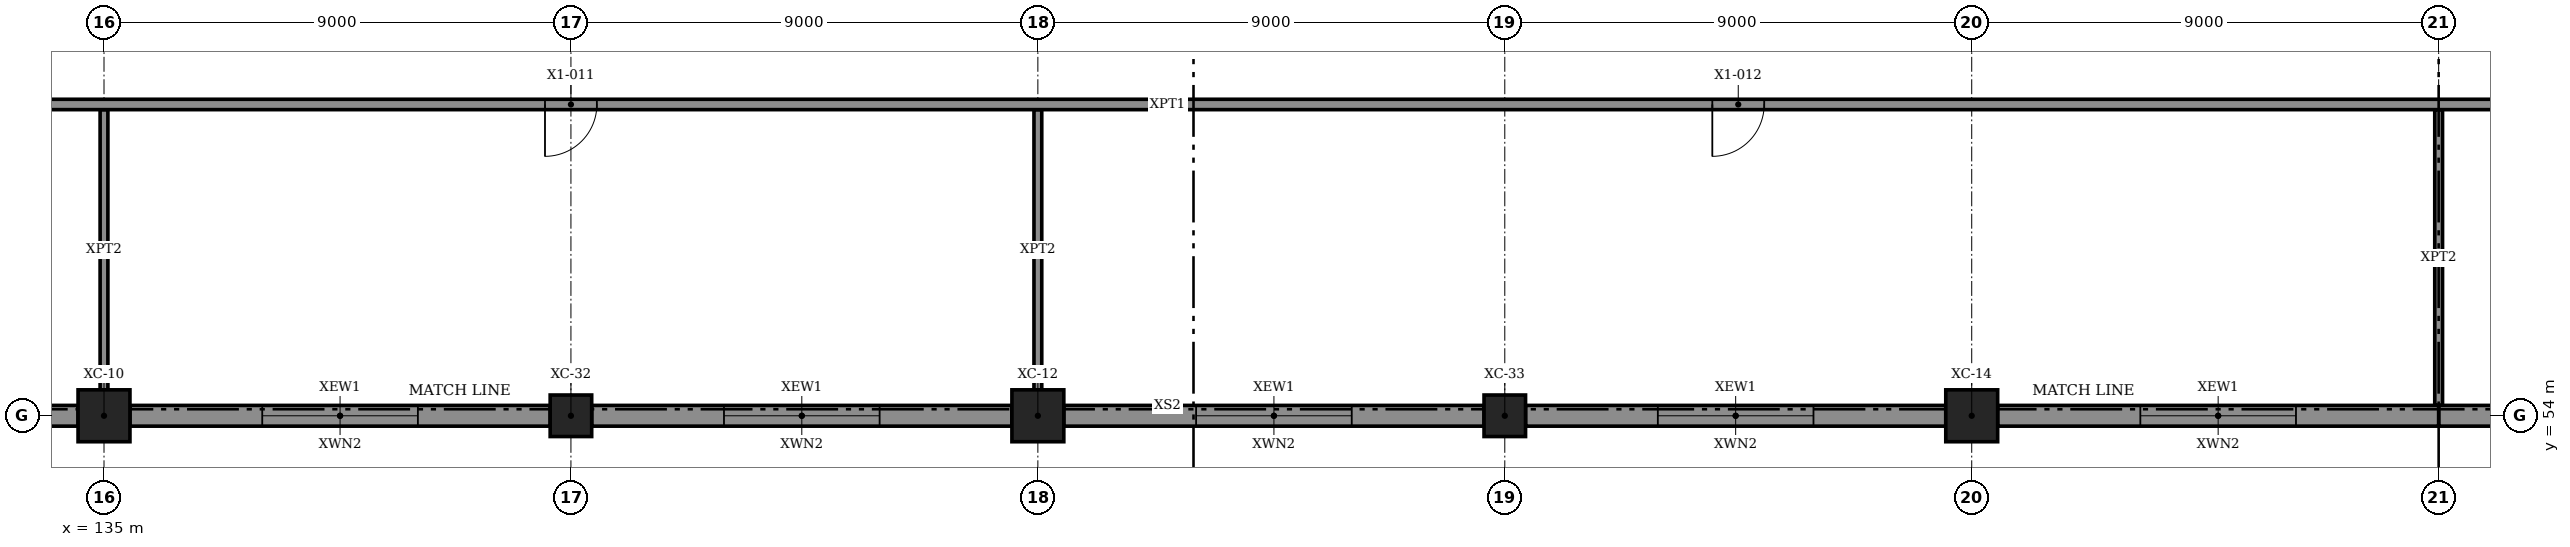
"""IFC4 building model, lengths in metres.
Left out: names, types, materials, properties, quantities, classifications, styles, units other than length and angle.
Written with IfcOpenShell. Run it as: python <this file> out.ifc"""

import sys

from ifc_helpers import new_model, si_unit, direction, frame, frame_2d, origin, origin_2d, place, context, subcontext, project, spatial, rectangle, hollow_rectangle, extrude, element, fill, save


model = new_model("IFC4")
c1 = context("Model", 3, precision=1e-05, world=origin(), true_north=direction((0.0, 1.0)))
c2 = subcontext(c1, "Body", "Model", "MODEL_VIEW")
j1 = project(units=[si_unit("LENGTHUNIT", "METRE"), si_unit("PLANEANGLEUNIT", "RADIAN")], contexts=[c1])
p1 = place(None, origin())
s1 = spatial("IfcSite", under=j1, at=p1, CompositionType="ELEMENT")
p2 = place(p1, origin())
s2 = spatial("IfcBuilding", under=s1, at=p2, CompositionType="ELEMENT")
p3 = place(p2, frame((0.0, 0.0, 6.0)))
s3 = spatial("IfcBuildingStorey", under=s2, at=p3, CompositionType="ELEMENT", Elevation=6.0)
for number, where, z_axis, x_axis in (
    (1, (135.0, 54.0, 0.0), (0.0, 0.0, 1.0), (1.0, 0.0, 0.0)),
    (2, (153.0, 54.0, 0.0), (0.0, 0.0, 1.0), (1.0, 0.0, 0.0)),
    (3, (171.0, 54.0, 0.0), (0.0, 0.0, 1.0), (1.0, 0.0, 0.0)),
):
    element("IfcColumn", number, at=place(p3, frame(where, z_axis=z_axis, x_axis=x_axis)), inside=s3, PredefinedType="COLUMN", context=c2, shape_type="SweptSolid", body=[
        extrude(hollow_rectangle(XDim=1.0, YDim=1.0, WallThickness=0.032, at=origin_2d()), origin(), (0.0, 0.0, 1.0), 5.5),
    ])
for number, where, z_axis, x_axis in (
    (4, (144.0, 54.0, 0.0), (0.0, 0.0, 1.0), (1.0, 0.0, 0.0)),
    (5, (162.0, 54.0, 0.0), (0.0, 0.0, 1.0), (1.0, 0.0, 0.0)),
):
    element("IfcColumn", number, at=place(p3, frame(where, z_axis=z_axis, x_axis=x_axis)), inside=s3, PredefinedType="COLUMN", context=c2, shape_type="SweptSolid", body=[
        extrude(rectangle(XDim=0.8, YDim=0.8, at=origin_2d()), origin(), (0.0, 0.0, 1.0), 5.5),
    ])
p4 = place(p3, frame((126.0, 54.0, -0.28), z_axis=(0.0, 0.0, 1.0), x_axis=(1.0, 0.0, 0.0)))
e6 = element("IfcWall", 6, at=p4, inside=s3, PredefinedType="SOLIDWALL", context=c2, shape_type="SweptSolid", body=[
    extrude(rectangle(XDim=8.5, YDim=0.4, at=frame_2d((4.25, 0.0))), origin(), (0.0, 0.0, 1.0), 5.78),
])
p5 = place(p4, frame((2.75, 0.0, 1.18)))
e7 = element("IfcOpeningElement", 7, at=p5, cuts=e6, PredefinedType="OPENING", context=c2, shape_type="SweptSolid", body=[
    extrude(rectangle(XDim=3.0, YDim=1.8, at=frame_2d((1.5, 0.9))), frame((0.0, 0.21, 0.0), z_axis=(0.0, -1.0, 0.0), x_axis=(1.0, 0.0, 0.0)), (0.0, 0.0, 1.0), 0.42),
])
p6 = place(p3, frame((135.5, 54.0, -0.28), z_axis=(0.0, 0.0, 1.0), x_axis=(1.0, 0.0, 0.0)))
e8 = element("IfcWall", 8, at=p6, inside=s3, PredefinedType="SOLIDWALL", context=c2, shape_type="SweptSolid", body=[
    extrude(rectangle(XDim=8.1, YDim=0.4, at=frame_2d((4.05, 0.0))), origin(), (0.0, 0.0, 1.0), 5.78),
])
p7 = place(p6, frame((2.55, 0.0, 1.18)))
e9 = element("IfcOpeningElement", 9, at=p7, cuts=e8, PredefinedType="OPENING", context=c2, shape_type="SweptSolid", body=[
    extrude(rectangle(XDim=3.0, YDim=1.8, at=frame_2d((1.5, 0.9))), frame((0.0, 0.21, 0.0), z_axis=(0.0, -1.0, 0.0), x_axis=(1.0, 0.0, 0.0)), (0.0, 0.0, 1.0), 0.42),
])
p8 = place(p3, frame((144.4, 54.0, -0.28), z_axis=(0.0, 0.0, 1.0), x_axis=(1.0, 0.0, 0.0)))
e10 = element("IfcWall", 10, at=p8, inside=s3, PredefinedType="SOLIDWALL", context=c2, shape_type="SweptSolid", body=[
    extrude(rectangle(XDim=8.1, YDim=0.4, at=frame_2d((4.05, 0.0))), origin(), (0.0, 0.0, 1.0), 5.78),
])
p9 = place(p8, frame((2.55, 0.0, 1.18)))
e11 = element("IfcOpeningElement", 11, at=p9, cuts=e10, PredefinedType="OPENING", context=c2, shape_type="SweptSolid", body=[
    extrude(rectangle(XDim=3.0, YDim=1.8, at=frame_2d((1.5, 0.9))), frame((0.0, 0.21, 0.0), z_axis=(0.0, -1.0, 0.0), x_axis=(1.0, 0.0, 0.0)), (0.0, 0.0, 1.0), 0.42),
])
p10 = place(p3, frame((153.5, 54.0, -0.28), z_axis=(0.0, 0.0, 1.0), x_axis=(1.0, 0.0, 0.0)))
e12 = element("IfcWall", 12, at=p10, inside=s3, PredefinedType="SOLIDWALL", context=c2, shape_type="SweptSolid", body=[
    extrude(rectangle(XDim=8.1, YDim=0.4, at=frame_2d((4.05, 0.0))), origin(), (0.0, 0.0, 1.0), 5.78),
])
p11 = place(p10, frame((2.55, 0.0, 1.18)))
e13 = element("IfcOpeningElement", 13, at=p11, cuts=e12, PredefinedType="OPENING", context=c2, shape_type="SweptSolid", body=[
    extrude(rectangle(XDim=3.0, YDim=1.8, at=frame_2d((1.5, 0.9))), frame((0.0, 0.21, 0.0), z_axis=(0.0, -1.0, 0.0), x_axis=(1.0, 0.0, 0.0)), (0.0, 0.0, 1.0), 0.42),
])
p12 = place(p3, frame((162.4, 54.0, -0.28), z_axis=(0.0, 0.0, 1.0), x_axis=(1.0, 0.0, 0.0)))
e14 = element("IfcWall", 14, at=p12, inside=s3, PredefinedType="SOLIDWALL", context=c2, shape_type="SweptSolid", body=[
    extrude(rectangle(XDim=8.1, YDim=0.4, at=frame_2d((4.05, 0.0))), origin(), (0.0, 0.0, 1.0), 5.78),
])
p13 = place(p12, frame((2.55, 0.0, 1.18)))
e15 = element("IfcOpeningElement", 15, at=p13, cuts=e14, PredefinedType="OPENING", context=c2, shape_type="SweptSolid", body=[
    extrude(rectangle(XDim=3.0, YDim=1.8, at=frame_2d((1.5, 0.9))), frame((0.0, 0.21, 0.0), z_axis=(0.0, -1.0, 0.0), x_axis=(1.0, 0.0, 0.0)), (0.0, 0.0, 1.0), 0.42),
])
p14 = place(p3, frame((171.5, 54.0, -0.28), z_axis=(0.0, 0.0, 1.0), x_axis=(1.0, 0.0, 0.0)))
e16 = element("IfcWall", 16, at=p14, inside=s3, PredefinedType="SOLIDWALL", context=c2, shape_type="SweptSolid", body=[
    extrude(rectangle(XDim=8.5, YDim=0.4, at=frame_2d((4.25, 0.0))), origin(), (0.0, 0.0, 1.0), 5.78),
])
p15 = place(p14, frame((2.75, 0.0, 1.18)))
e17 = element("IfcOpeningElement", 17, at=p15, cuts=e16, PredefinedType="OPENING", context=c2, shape_type="SweptSolid", body=[
    extrude(rectangle(XDim=3.0, YDim=1.8, at=frame_2d((1.5, 0.9))), frame((0.0, 0.21, 0.0), z_axis=(0.0, -1.0, 0.0), x_axis=(1.0, 0.0, 0.0)), (0.0, 0.0, 1.0), 0.42),
])
p16 = place(p3, frame((180.0, 54.0, -0.28), z_axis=(0.0, 0.0, 1.0), x_axis=(1.0, 0.0, 0.0)))
e18 = element("IfcWall", 18, at=p16, inside=s3, PredefinedType="SOLIDWALL", context=c2, shape_type="SweptSolid", body=[
    extrude(rectangle(XDim=8.5, YDim=0.4, at=frame_2d((4.25, 0.0))), origin(), (0.0, 0.0, 1.0), 5.78),
])
p17 = place(p16, frame((2.75, 0.0, 1.18)))
e19 = element("IfcOpeningElement", 19, at=p17, cuts=e18, PredefinedType="OPENING", context=c2, shape_type="SweptSolid", body=[
    extrude(rectangle(XDim=3.0, YDim=1.8, at=frame_2d((1.5, 0.9))), frame((0.0, 0.21, 0.0), z_axis=(0.0, -1.0, 0.0), x_axis=(1.0, 0.0, 0.0)), (0.0, 0.0, 1.0), 0.42),
])
p18 = place(p3, frame((99.2, 60.0, 0.0), z_axis=(0.0, 0.0, 1.0), x_axis=(1.0, 0.0, 0.0)))
e20 = element("IfcWall", 20, at=p18, inside=s3, PredefinedType="PARTITIONING", context=c2, shape_type="SweptSolid", body=[
    extrude(rectangle(XDim=161.6, YDim=0.2, at=frame_2d((80.8, 0.0))), origin(), (0.0, 0.0, 1.0), 5.25),
])
p19 = place(p18, frame((8.3, 0.0, 0.015)))
e21 = element("IfcOpeningElement", 21, at=p19, cuts=e20, PredefinedType="OPENING", context=c2, shape_type="SweptSolid", body=[
    extrude(rectangle(XDim=1.0, YDim=2.4, at=frame_2d((0.5, 1.2))), frame((0.0, 0.11, 0.0), z_axis=(0.0, -1.0, 0.0), x_axis=(1.0, 0.0, 0.0)), (0.0, 0.0, 1.0), 0.22),
])
p20 = place(p18, frame((26.3, 0.0, 0.015)))
e22 = element("IfcOpeningElement", 22, at=p20, cuts=e20, PredefinedType="OPENING", context=c2, shape_type="SweptSolid", body=[
    extrude(rectangle(XDim=1.0, YDim=2.4, at=frame_2d((0.5, 1.2))), frame((0.0, 0.11, 0.0), z_axis=(0.0, -1.0, 0.0), x_axis=(1.0, 0.0, 0.0)), (0.0, 0.0, 1.0), 0.22),
])
p21 = place(p18, frame((44.3, 0.0, 0.015)))
e23 = element("IfcOpeningElement", 23, at=p21, cuts=e20, PredefinedType="OPENING", context=c2, shape_type="SweptSolid", body=[
    extrude(rectangle(XDim=1.0, YDim=2.4, at=frame_2d((0.5, 1.2))), frame((0.0, 0.11, 0.0), z_axis=(0.0, -1.0, 0.0), x_axis=(1.0, 0.0, 0.0)), (0.0, 0.0, 1.0), 0.22),
])
p22 = place(p18, frame((66.8, 0.0, 0.015)))
e24 = element("IfcOpeningElement", 24, at=p22, cuts=e20, PredefinedType="OPENING", context=c2, shape_type="SweptSolid", body=[
    extrude(rectangle(XDim=1.0, YDim=2.4, at=frame_2d((0.5, 1.2))), frame((0.0, 0.11, 0.0), z_axis=(0.0, -1.0, 0.0), x_axis=(1.0, 0.0, 0.0)), (0.0, 0.0, 1.0), 0.22),
])
p23 = place(p18, frame((89.3, 0.0, 0.015)))
e25 = element("IfcOpeningElement", 25, at=p23, cuts=e20, PredefinedType="OPENING", context=c2, shape_type="SweptSolid", body=[
    extrude(rectangle(XDim=1.0, YDim=2.4, at=frame_2d((0.5, 1.2))), frame((0.0, 0.11, 0.0), z_axis=(0.0, -1.0, 0.0), x_axis=(1.0, 0.0, 0.0)), (0.0, 0.0, 1.0), 0.22),
])
p24 = place(p18, frame((107.3, 0.0, 0.015)))
e26 = element("IfcOpeningElement", 26, at=p24, cuts=e20, PredefinedType="OPENING", context=c2, shape_type="SweptSolid", body=[
    extrude(rectangle(XDim=1.0, YDim=2.4, at=frame_2d((0.5, 1.2))), frame((0.0, 0.11, 0.0), z_axis=(0.0, -1.0, 0.0), x_axis=(1.0, 0.0, 0.0)), (0.0, 0.0, 1.0), 0.22),
])
p25 = place(p18, frame((125.3, 0.0, 0.015)))
e27 = element("IfcOpeningElement", 27, at=p25, cuts=e20, PredefinedType="OPENING", context=c2, shape_type="SweptSolid", body=[
    extrude(rectangle(XDim=1.0, YDim=2.4, at=frame_2d((0.5, 1.2))), frame((0.0, 0.11, 0.0), z_axis=(0.0, -1.0, 0.0), x_axis=(1.0, 0.0, 0.0)), (0.0, 0.0, 1.0), 0.22),
])
p26 = place(p18, frame((147.8, 0.0, 0.015)))
e28 = element("IfcOpeningElement", 28, at=p26, cuts=e20, PredefinedType="OPENING", context=c2, shape_type="SweptSolid", body=[
    extrude(rectangle(XDim=1.0, YDim=2.4, at=frame_2d((0.5, 1.2))), frame((0.0, 0.11, 0.0), z_axis=(0.0, -1.0, 0.0), x_axis=(1.0, 0.0, 0.0)), (0.0, 0.0, 1.0), 0.22),
])
for number, where, z_axis, x_axis in (
    (29, (135.0, 54.5, 0.0), (0.0, 0.0, 1.0), (0.0, 1.0, 0.0)),
    (30, (153.0, 54.5, 0.0), (0.0, 0.0, 1.0), (0.0, 1.0, 0.0)),
):
    element("IfcWall", number, at=place(p3, frame(where, z_axis=z_axis, x_axis=x_axis)), inside=s3, PredefinedType="PARTITIONING", context=c2, shape_type="SweptSolid", body=[
        extrude(rectangle(XDim=5.4, YDim=0.15, at=frame_2d((2.7, 0.0))), origin(), (0.0, 0.0, 1.0), 5.25),
    ])
p27 = place(p3, frame((180.0, 54.2, 0.0), z_axis=(0.0, 0.0, 1.0), x_axis=(0.0, 1.0, 0.0)))
e31 = element("IfcWall", 31, at=p27, inside=s3, PredefinedType="PARTITIONING", context=c2, shape_type="SweptSolid", body=[
    extrude(rectangle(XDim=5.7, YDim=0.15, at=frame_2d((2.85, 0.0))), origin(), (0.0, 0.0, 1.0), 5.25),
])
p28 = place(p7, origin())
e32 = element("IfcWindow", 32, at=p28, inside=s3, PartitioningType="TRIPLE_PANEL_VERTICAL", PredefinedType="WINDOW", context=c2, shape_type="SweptSolid", body=[
    extrude(rectangle(XDim=3.0, YDim=1.8, at=frame_2d((1.5, 0.9))), frame((0.0, 0.03, 0.0), z_axis=(0.0, -1.0, 0.0), x_axis=(1.0, 0.0, 0.0)), (0.0, 0.0, 1.0), 0.06),
])
fill(e9, e32)
p29 = place(p9, origin())
e33 = element("IfcWindow", 33, at=p29, inside=s3, PartitioningType="TRIPLE_PANEL_VERTICAL", PredefinedType="WINDOW", context=c2, shape_type="SweptSolid", body=[
    extrude(rectangle(XDim=3.0, YDim=1.8, at=frame_2d((1.5, 0.9))), frame((0.0, 0.03, 0.0), z_axis=(0.0, -1.0, 0.0), x_axis=(1.0, 0.0, 0.0)), (0.0, 0.0, 1.0), 0.06),
])
fill(e11, e33)
p30 = place(p11, origin())
e34 = element("IfcWindow", 34, at=p30, inside=s3, PartitioningType="TRIPLE_PANEL_VERTICAL", PredefinedType="WINDOW", context=c2, shape_type="SweptSolid", body=[
    extrude(rectangle(XDim=3.0, YDim=1.8, at=frame_2d((1.5, 0.9))), frame((0.0, 0.03, 0.0), z_axis=(0.0, -1.0, 0.0), x_axis=(1.0, 0.0, 0.0)), (0.0, 0.0, 1.0), 0.06),
])
fill(e13, e34)
p31 = place(p13, origin())
e35 = element("IfcWindow", 35, at=p31, inside=s3, PartitioningType="TRIPLE_PANEL_VERTICAL", PredefinedType="WINDOW", context=c2, shape_type="SweptSolid", body=[
    extrude(rectangle(XDim=3.0, YDim=1.8, at=frame_2d((1.5, 0.9))), frame((0.0, 0.03, 0.0), z_axis=(0.0, -1.0, 0.0), x_axis=(1.0, 0.0, 0.0)), (0.0, 0.0, 1.0), 0.06),
])
fill(e15, e35)
p32 = place(p15, origin())
e36 = element("IfcWindow", 36, at=p32, inside=s3, PartitioningType="TRIPLE_PANEL_VERTICAL", PredefinedType="WINDOW", context=c2, shape_type="SweptSolid", body=[
    extrude(rectangle(XDim=3.0, YDim=1.8, at=frame_2d((1.5, 0.9))), frame((0.0, 0.03, 0.0), z_axis=(0.0, -1.0, 0.0), x_axis=(1.0, 0.0, 0.0)), (0.0, 0.0, 1.0), 0.06),
])
fill(e17, e36)
p33 = place(p21, frame((1.0, 0.0, 0.0), z_axis=(0.0, 0.0, 1.0), x_axis=(-1.0, 0.0, 0.0)))
e37 = element("IfcDoor", 37, at=p33, inside=s3, OperationType="SINGLE_SWING_LEFT", PredefinedType="DOOR", context=c2, shape_type="SweptSolid", body=[
    extrude(rectangle(XDim=1.0, YDim=2.4, at=frame_2d((0.5, 1.2))), frame((0.0, 0.025, 0.0), z_axis=(0.0, -1.0, 0.0), x_axis=(1.0, 0.0, 0.0)), (0.0, 0.0, 1.0), 0.05),
])
fill(e23, e37)
p34 = place(p22, frame((1.0, 0.0, 0.0), z_axis=(0.0, 0.0, 1.0), x_axis=(-1.0, 0.0, 0.0)))
e38 = element("IfcDoor", 38, at=p34, inside=s3, OperationType="SINGLE_SWING_LEFT", PredefinedType="DOOR", context=c2, shape_type="SweptSolid", body=[
    extrude(rectangle(XDim=1.0, YDim=2.4, at=frame_2d((0.5, 1.2))), frame((0.0, 0.025, 0.0), z_axis=(0.0, -1.0, 0.0), x_axis=(1.0, 0.0, 0.0)), (0.0, 0.0, 1.0), 0.05),
])
fill(e24, e38)
save(model, sys.argv[1])
